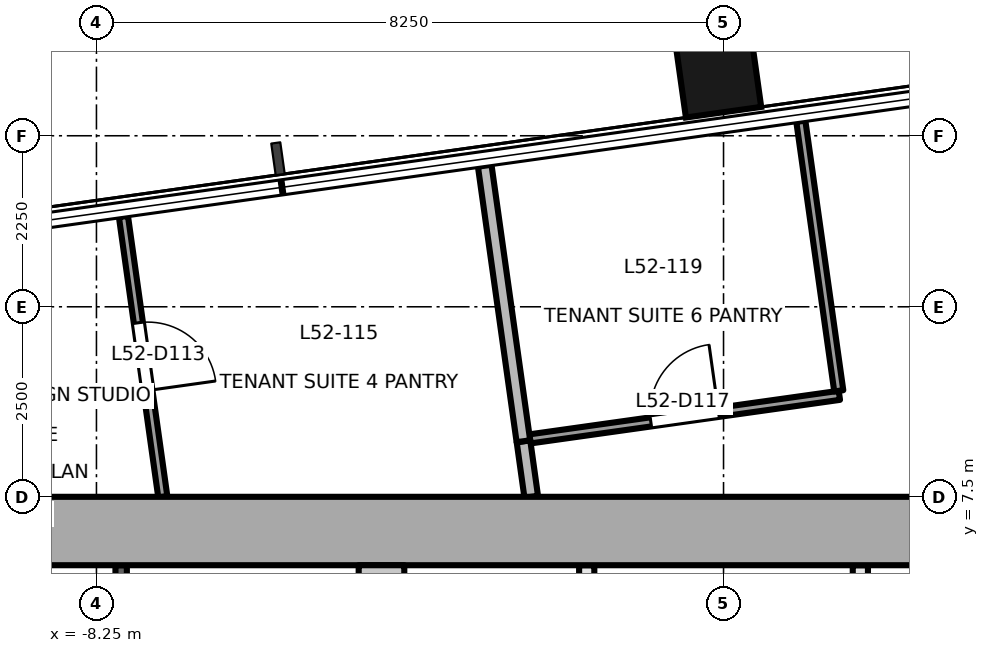
"""IFC4 building model, lengths in metres.
Left out: names, types, materials, properties, quantities, classifications, styles, units other than length and angle.
Written with IfcOpenShell. Run it as: python <this file> out.ifc"""

import sys

from ifc_helpers import new_model, si_unit, direction, frame, frame_2d, origin, origin_2d, place, context, subcontext, project, spatial, rectangle, extrude, element, fill, save


model = new_model("IFC4")
c1 = context("Model", 3, precision=1e-05, world=origin(), true_north=direction((0.0, 1.0)))
c2 = subcontext(c1, "Body", "Model", "MODEL_VIEW")
j1 = project(units=[si_unit("LENGTHUNIT", "METRE"), si_unit("PLANEANGLEUNIT", "RADIAN")], contexts=[c1])
p1 = place(None, origin())
s1 = spatial("IfcSite", under=j1, at=p1, CompositionType="ELEMENT")
p2 = place(p1, origin())
s2 = spatial("IfcBuilding", under=s1, at=p2, CompositionType="ELEMENT")
p3 = place(p2, frame((0.0, 0.0, 229.1)))
s3 = spatial("IfcBuildingStorey", under=s2, at=p3, CompositionType="ELEMENT", Elevation=229.1)
p4 = place(p3, frame((-0.125, 13.451, -0.2), z_axis=(0.0, 0.0, 1.0), x_axis=(0.990268068742, 0.13917310096, 0.0)))
e1 = element("IfcColumn", 1, at=p4, inside=s3, PredefinedType="COLUMN", context=c2, shape_type="SweptSolid", body=[
    extrude(rectangle(XDim=1.0, YDim=1.8, at=origin_2d()), origin(), (0.0, 0.0, 1.0), 3.9),
])
p5 = place(p3, frame((-18.0, 7.05, -0.2), z_axis=(0.0, 0.0, 1.0), x_axis=(1.0, 0.0, 0.0)))
e2 = element("IfcWall", 2, at=p5, inside=s3, PredefinedType="SHEAR", context=c2, shape_type="SweptSolid", body=[
    extrude(rectangle(XDim=36.0, YDim=0.9, at=frame_2d((18.0, 0.0))), origin(), (0.0, 0.0, 1.0), 3.9),
])
p6 = place(p3, frame((-4.5, -6.6, -0.2), z_axis=(0.0, 0.0, 1.0), x_axis=(0.0, 1.0, 0.0)))
e3 = element("IfcWall", 3, at=p6, inside=s3, PredefinedType="SHEAR", context=c2, shape_type="SweptSolid", body=[
    extrude(rectangle(XDim=13.2, YDim=0.6, at=frame_2d((6.6, 0.0))), origin(), (0.0, 0.0, 1.0), 3.9),
])
p7 = place(p3, frame((-7.925, -6.6, 0.0), z_axis=(0.0, 0.0, 1.0), x_axis=(0.0, 1.0, 0.0)))
e4 = element("IfcWall", 4, at=p7, inside=s3, PredefinedType="PARTITIONING", context=c2, shape_type="SweptSolid", body=[
    extrude(rectangle(XDim=13.2, YDim=0.15, at=frame_2d((6.6, 0.0))), origin(), (0.0, 0.0, 1.0), 3.7),
])
p8 = place(p7, frame((0.87, 0.0, 0.0)))
e5 = element("IfcOpeningElement", 5, at=p8, cuts=e4, PredefinedType="OPENING", context=c2, shape_type="SweptSolid", body=[
    extrude(rectangle(XDim=0.9, YDim=2.1, at=frame_2d((0.45, 1.05))), frame((0.0, 0.085, 0.0), z_axis=(0.0, -1.0, 0.0), x_axis=(1.0, 0.0, 0.0)), (0.0, 0.0, 1.0), 0.171),
])
p9 = place(p7, frame((3.51, 0.0, 0.0)))
e6 = element("IfcOpeningElement", 6, at=p9, cuts=e4, PredefinedType="OPENING", context=c2, shape_type="SweptSolid", body=[
    extrude(rectangle(XDim=0.9, YDim=2.1, at=frame_2d((0.45, 1.05))), frame((0.0, 0.085, 0.0), z_axis=(0.0, -1.0, 0.0), x_axis=(1.0, 0.0, 0.0)), (0.0, 0.0, 1.0), 0.171),
])
p10 = place(p7, frame((6.15, 0.0, 0.0)))
e7 = element("IfcOpeningElement", 7, at=p10, cuts=e4, PredefinedType="OPENING", context=c2, shape_type="SweptSolid", body=[
    extrude(rectangle(XDim=0.9, YDim=2.1, at=frame_2d((0.45, 1.05))), frame((0.0, 0.085, 0.0), z_axis=(0.0, -1.0, 0.0), x_axis=(1.0, 0.0, 0.0)), (0.0, 0.0, 1.0), 0.171),
])
p11 = place(p7, frame((8.79, 0.0, 0.0)))
e8 = element("IfcOpeningElement", 8, at=p11, cuts=e4, PredefinedType="OPENING", context=c2, shape_type="SweptSolid", body=[
    extrude(rectangle(XDim=0.9, YDim=2.1, at=frame_2d((0.45, 1.05))), frame((0.0, 0.085, 0.0), z_axis=(0.0, -1.0, 0.0), x_axis=(1.0, 0.0, 0.0)), (0.0, 0.0, 1.0), 0.171),
])
p12 = place(p7, frame((11.43, 0.0, 0.0)))
e9 = element("IfcOpeningElement", 9, at=p12, cuts=e4, PredefinedType="OPENING", context=c2, shape_type="SweptSolid", body=[
    extrude(rectangle(XDim=0.9, YDim=2.1, at=frame_2d((0.45, 1.05))), frame((0.0, 0.085, 0.0), z_axis=(0.0, -1.0, 0.0), x_axis=(1.0, 0.0, 0.0)), (0.0, 0.0, 1.0), 0.171),
])
p13 = place(p3, frame((-1.8, -6.6, 0.0), z_axis=(0.0, 0.0, 1.0), x_axis=(0.0, 1.0, 0.0)))
e10 = element("IfcWall", 10, at=p13, inside=s3, PredefinedType="PARTITIONING", context=c2, shape_type="SweptSolid", body=[
    extrude(rectangle(XDim=13.2, YDim=0.2, at=frame_2d((6.6, 0.0))), origin(), (0.0, 0.0, 1.0), 3.7),
])
p14 = place(p13, frame((0.55, 0.0, 0.0)))
e11 = element("IfcOpeningElement", 11, at=p14, cuts=e10, PredefinedType="OPENING", context=c2, shape_type="SweptSolid", body=[
    extrude(rectangle(XDim=0.9, YDim=2.1, at=frame_2d((0.45, 1.05))), frame((0.0, 0.111, 0.0), z_axis=(0.0, -1.0, 0.0), x_axis=(1.0, 0.0, 0.0)), (0.0, 0.0, 1.0), 0.221),
])
p15 = place(p13, frame((2.9, 0.0, 0.0)))
e12 = element("IfcOpeningElement", 12, at=p15, cuts=e10, PredefinedType="OPENING", context=c2, shape_type="SweptSolid", body=[
    extrude(rectangle(XDim=1.2, YDim=2.1, at=frame_2d((0.6, 1.05))), frame((0.0, 0.111, 0.0), z_axis=(0.0, -1.0, 0.0), x_axis=(1.0, 0.0, 0.0)), (0.0, 0.0, 1.0), 0.221),
])
p16 = place(p13, frame((5.7, 0.0, 0.0)))
e13 = element("IfcOpeningElement", 13, at=p16, cuts=e10, PredefinedType="OPENING", context=c2, shape_type="SweptSolid", body=[
    extrude(rectangle(XDim=1.2, YDim=2.1, at=frame_2d((0.6, 1.05))), frame((0.0, 0.111, 0.0), z_axis=(0.0, -1.0, 0.0), x_axis=(1.0, 0.0, 0.0)), (0.0, 0.0, 1.0), 0.221),
])
p17 = place(p13, frame((8.5, 0.0, 0.0)))
e14 = element("IfcOpeningElement", 14, at=p17, cuts=e10, PredefinedType="OPENING", context=c2, shape_type="SweptSolid", body=[
    extrude(rectangle(XDim=1.2, YDim=2.1, at=frame_2d((0.6, 1.05))), frame((0.0, 0.111, 0.0), z_axis=(0.0, -1.0, 0.0), x_axis=(1.0, 0.0, 0.0)), (0.0, 0.0, 1.0), 0.221),
])
p18 = place(p13, frame((11.3, 0.0, 0.0)))
e15 = element("IfcOpeningElement", 15, at=p18, cuts=e10, PredefinedType="OPENING", context=c2, shape_type="SweptSolid", body=[
    extrude(rectangle(XDim=1.2, YDim=2.1, at=frame_2d((0.6, 1.05))), frame((0.0, 0.111, 0.0), z_axis=(0.0, -1.0, 0.0), x_axis=(1.0, 0.0, 0.0)), (0.0, 0.0, 1.0), 0.221),
])
p19 = place(p3, frame((1.8, -6.6, 0.0), z_axis=(0.0, 0.0, 1.0), x_axis=(0.0, 1.0, 0.0)))
e16 = element("IfcWall", 16, at=p19, inside=s3, PredefinedType="PARTITIONING", context=c2, shape_type="SweptSolid", body=[
    extrude(rectangle(XDim=13.2, YDim=0.2, at=frame_2d((6.6, 0.0))), origin(), (0.0, 0.0, 1.0), 3.7),
])
p20 = place(p19, frame((0.55, 0.0, 0.0)))
e17 = element("IfcOpeningElement", 17, at=p20, cuts=e16, PredefinedType="OPENING", context=c2, shape_type="SweptSolid", body=[
    extrude(rectangle(XDim=0.9, YDim=2.1, at=frame_2d((0.45, 1.05))), frame((0.0, 0.111, 0.0), z_axis=(0.0, -1.0, 0.0), x_axis=(1.0, 0.0, 0.0)), (0.0, 0.0, 1.0), 0.221),
])
p21 = place(p19, frame((2.9, 0.0, 0.0)))
e18 = element("IfcOpeningElement", 18, at=p21, cuts=e16, PredefinedType="OPENING", context=c2, shape_type="SweptSolid", body=[
    extrude(rectangle(XDim=1.2, YDim=2.1, at=frame_2d((0.6, 1.05))), frame((0.0, 0.111, 0.0), z_axis=(0.0, -1.0, 0.0), x_axis=(1.0, 0.0, 0.0)), (0.0, 0.0, 1.0), 0.221),
])
p22 = place(p19, frame((5.7, 0.0, 0.0)))
e19 = element("IfcOpeningElement", 19, at=p22, cuts=e16, PredefinedType="OPENING", context=c2, shape_type="SweptSolid", body=[
    extrude(rectangle(XDim=1.2, YDim=2.1, at=frame_2d((0.6, 1.05))), frame((0.0, 0.111, 0.0), z_axis=(0.0, -1.0, 0.0), x_axis=(1.0, 0.0, 0.0)), (0.0, 0.0, 1.0), 0.221),
])
p23 = place(p19, frame((8.5, 0.0, 0.0)))
e20 = element("IfcOpeningElement", 20, at=p23, cuts=e16, PredefinedType="OPENING", context=c2, shape_type="SweptSolid", body=[
    extrude(rectangle(XDim=1.2, YDim=2.1, at=frame_2d((0.6, 1.05))), frame((0.0, 0.111, 0.0), z_axis=(0.0, -1.0, 0.0), x_axis=(1.0, 0.0, 0.0)), (0.0, 0.0, 1.0), 0.221),
])
p24 = place(p19, frame((11.3, 0.0, 0.0)))
e21 = element("IfcOpeningElement", 21, at=p24, cuts=e16, PredefinedType="OPENING", context=c2, shape_type="SweptSolid", body=[
    extrude(rectangle(XDim=1.2, YDim=2.1, at=frame_2d((0.6, 1.05))), frame((0.0, 0.111, 0.0), z_axis=(0.0, -1.0, 0.0), x_axis=(1.0, 0.0, 0.0)), (0.0, 0.0, 1.0), 0.221),
])
p25 = place(p3, frame((-7.895, 11.188, 0.0), z_axis=(0.0, 0.0, 1.0), x_axis=(0.139108182039, -0.990277190331, 0.0)))
e22 = element("IfcWall", 22, at=p25, inside=s3, PredefinedType="PARTITIONING", context=c2, shape_type="SweptSolid", body=[
    extrude(rectangle(XDim=3.724, YDim=0.12, at=frame_2d((1.862, 0.0))), origin(), (0.0, 0.0, 1.0), 3.7),
])
p26 = place(p25, frame((1.412, 0.0, 0.0)))
e23 = element("IfcOpeningElement", 23, at=p26, cuts=e22, PredefinedType="OPENING", context=c2, shape_type="SweptSolid", body=[
    extrude(rectangle(XDim=0.9, YDim=2.1, at=frame_2d((0.45, 1.05))), frame((0.0, 0.071, 0.0), z_axis=(0.0, -1.0, 0.0), x_axis=(1.0, 0.0, 0.0)), (0.0, 0.0, 1.0), 0.141),
])
p27 = place(p3, frame((-2.632, 8.23, 0.0), z_axis=(0.0, 0.0, 1.0), x_axis=(0.138452925943, -0.99036901572, 0.0)))
e24 = element("IfcWall", 24, at=p27, inside=s3, PredefinedType="PARTITIONING", context=c2, shape_type="SweptSolid", body=[
    extrude(rectangle(XDim=0.737, YDim=0.18, at=frame_2d((0.369, 0.0))), origin(), (0.0, 0.0, 1.0), 3.7),
])
p28 = place(p3, frame((-3.142, 11.856, 0.0), z_axis=(0.0, 0.0, 1.0), x_axis=(0.139058624332, -0.990284150635, 0.0)))
e25 = element("IfcWall", 25, at=p28, inside=s3, PredefinedType="PARTITIONING", context=c2, shape_type="SweptSolid", body=[
    extrude(rectangle(XDim=3.661, YDim=0.18, at=frame_2d((1.83, 0.0))), origin(), (0.0, 0.0, 1.0), 3.7),
])
p29 = place(p3, frame((-2.546, 8.262, 0.0), z_axis=(0.0, 0.0, 1.0), x_axis=(0.990233783149, 0.139416837975, 0.0)))
e26 = element("IfcWall", 26, at=p29, inside=s3, PredefinedType="PARTITIONING", context=c2, shape_type="SweptSolid", body=[
    extrude(rectangle(XDim=4.11, YDim=0.12, at=frame_2d((2.055, 0.0))), origin(), (0.0, 0.0, 1.0), 3.4),
])
p30 = place(p29, frame((1.605, 0.0, 0.0)))
e27 = element("IfcOpeningElement", 27, at=p30, cuts=e26, PredefinedType="OPENING", context=c2, shape_type="SweptSolid", body=[
    extrude(rectangle(XDim=0.9, YDim=2.1, at=frame_2d((0.45, 1.05))), frame((0.0, 0.071, 0.0), z_axis=(0.0, -1.0, 0.0), x_axis=(1.0, 0.0, 0.0)), (0.0, 0.0, 1.0), 0.141),
])
p31 = place(p3, frame((1.516, 8.894, 0.0), z_axis=(0.0, 0.0, 1.0), x_axis=(-0.139321670591, 0.990247177276, 0.0)))
e28 = element("IfcWall", 28, at=p31, inside=s3, PredefinedType="PARTITIONING", context=c2, shape_type="SweptSolid", body=[
    extrude(rectangle(XDim=3.582, YDim=0.12, at=frame_2d((1.791, 0.0))), origin(), (0.0, 0.0, 1.0), 3.7),
])
p32 = place(p26, origin())
e29 = element("IfcDoor", 29, at=p32, inside=s3, OperationType="SINGLE_SWING_RIGHT", PredefinedType="DOOR", context=c2, shape_type="SweptSolid", body=[
    extrude(rectangle(XDim=0.9, YDim=2.1, at=frame_2d((0.45, 1.05))), frame((0.0, 0.025, 0.0), z_axis=(0.0, -1.0, 0.0), x_axis=(1.0, 0.0, 0.0)), (0.0, 0.0, 1.0), 0.05),
])
fill(e23, e29)
p33 = place(p30, origin())
e30 = element("IfcDoor", 30, at=p33, inside=s3, OperationType="SINGLE_SWING_RIGHT", PredefinedType="DOOR", context=c2, shape_type="SweptSolid", body=[
    extrude(rectangle(XDim=0.9, YDim=2.1, at=frame_2d((0.45, 1.05))), frame((0.0, 0.025, 0.0), z_axis=(0.0, -1.0, 0.0), x_axis=(1.0, 0.0, 0.0)), (0.0, 0.0, 1.0), 0.05),
])
fill(e27, e30)
save(model, sys.argv[1])
